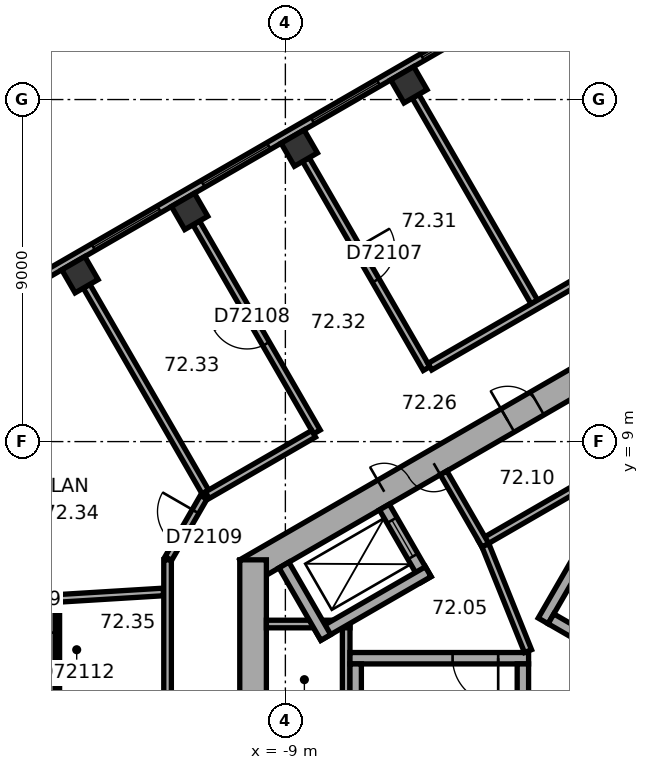
"""IFC4 building model, lengths in metres.
Left out: names, types, materials, properties, quantities, classifications, styles, units other than length and angle.
Written with IfcOpenShell. Run it as: python <this file> out.ifc"""

import sys

from ifc_helpers import new_model, si_unit, direction, frame, frame_2d, origin, origin_2d, place, context, subcontext, project, spatial, rectangle, extrude, element, fill, save


model = new_model("IFC4")
c1 = context("Model", 3, precision=1e-05, world=origin(), true_north=direction((0.0, 1.0)))
c2 = subcontext(c1, "Body", "Model", "MODEL_VIEW")
j1 = project(units=[si_unit("LENGTHUNIT", "METRE"), si_unit("PLANEANGLEUNIT", "RADIAN")], contexts=[c1])
p1 = place(None, origin())
s1 = spatial("IfcSite", under=j1, at=p1, CompositionType="ELEMENT")
p2 = place(p1, origin())
s2 = spatial("IfcBuilding", under=s1, at=p2, CompositionType="ELEMENT")
p3 = place(p2, frame((0.0, 0.0, 293.1)))
s3 = spatial("IfcBuildingStorey", under=s2, at=p3, CompositionType="ELEMENT", Elevation=293.1)
for number, where, z_axis, x_axis in (
    (1, (-5.75, 18.389, 0.0), (0.0, 0.0, 1.0), (-0.866, -0.5, 0.0)),
    (2, (-8.635, 16.723, 0.0), (0.0, 0.0, 1.0), (-0.866, -0.5, 0.0)),
    (3, (-11.52, 15.057, 0.0), (0.0, 0.0, 1.0), (-0.866, -0.5, 0.0)),
    (4, (-14.406, 13.391, 0.0), (0.0, 0.0, 1.0), (-0.866, -0.5, 0.0)),
):
    element("IfcColumn", number, at=place(p3, frame(where, z_axis=z_axis, x_axis=x_axis)), inside=s3, PredefinedType="COLUMN", context=c2, shape_type="SweptSolid", body=[
        extrude(rectangle(XDim=0.7, YDim=0.7, at=origin_2d()), origin(), (0.0, 0.0, 1.0), 3.7),
    ])
p4 = place(p3, frame((0.175, 11.475, 0.0), z_axis=(0.0, 0.0, 1.0), x_axis=(-0.866026453023, -0.499998182661, 0.0)))
e5 = element("IfcWall", 5, at=p4, inside=s3, PredefinedType="SHEAR", context=c2, shape_type="SweptSolid", body=[
    extrude(rectangle(XDim=11.778, YDim=0.7, at=frame_2d((5.889, 0.0))), origin(), (0.0, 0.0, 1.0), 3.7),
])
p5 = place(p4, frame((6.089, 0.0, 0.0)))
e6 = element("IfcOpeningElement", 6, at=p5, cuts=e5, PredefinedType="OPENING", context=c2, shape_type="SweptSolid", body=[
    extrude(rectangle(XDim=1.5, YDim=2.1, at=frame_2d((0.75, 1.05))), frame((0.0, 0.36, 0.0), z_axis=(0.0, -1.0, 0.0), x_axis=(1.0, 0.0, 0.0)), (0.0, 0.0, 1.0), 0.72),
])
p6 = place(p4, frame((2.939, 0.0, 0.0)))
e7 = element("IfcOpeningElement", 7, at=p6, cuts=e5, PredefinedType="OPENING", context=c2, shape_type="SweptSolid", body=[
    extrude(rectangle(XDim=0.9, YDim=2.1, at=frame_2d((0.45, 1.05))), frame((0.0, 0.36, 0.0), z_axis=(0.0, -1.0, 0.0), x_axis=(1.0, 0.0, 0.0)), (0.0, 0.0, 1.0), 0.72),
])
p7 = place(p3, frame((-9.85, 5.889, 0.0), z_axis=(0.0, 0.0, 1.0), x_axis=(0.0, -1.0, 0.0)))
e8 = element("IfcWall", 8, at=p7, inside=s3, PredefinedType="SHEAR", context=c2, shape_type="SweptSolid", body=[
    extrude(rectangle(XDim=11.778, YDim=0.7, at=frame_2d((5.889, 0.0))), origin(), (0.0, 0.0, 1.0), 3.7),
])
p8 = place(p7, frame((5.039, 0.0, 0.0)))
e9 = element("IfcOpeningElement", 9, at=p8, cuts=e8, PredefinedType="OPENING", context=c2, shape_type="SweptSolid", body=[
    extrude(rectangle(XDim=1.1, YDim=2.1, at=frame_2d((0.55, 1.05))), frame((0.0, 0.36, 0.0), z_axis=(0.0, -1.0, 0.0), x_axis=(1.0, 0.0, 0.0)), (0.0, 0.0, 1.0), 0.72),
])
p9 = place(p7, frame((7.639, 0.0, 0.0)))
e10 = element("IfcOpeningElement", 10, at=p9, cuts=e8, PredefinedType="OPENING", context=c2, shape_type="SweptSolid", body=[
    extrude(rectangle(XDim=1.1, YDim=2.1, at=frame_2d((0.55, 1.05))), frame((0.0, 0.36, 0.0), z_axis=(0.0, -1.0, 0.0), x_axis=(1.0, 0.0, 0.0)), (0.0, 0.0, 1.0), 0.72),
])
p10 = place(p3, frame((-2.624, 20.713, 0.0), z_axis=(0.0, 0.0, 1.0), x_axis=(-0.866026460444, -0.499998169808, 0.0)))
e11 = element("IfcWall", 11, at=p10, inside=s3, PredefinedType="STANDARD", context=c2, shape_type="SweptSolid", body=[
    extrude(rectangle(XDim=17.731, YDim=0.2, at=frame_2d((8.866, 0.0))), origin(), (0.0, 0.0, 1.0), 3.7),
])
p11 = place(p10, frame((1.203, 0.0, 0.9)))
e12 = element("IfcOpeningElement", 12, at=p11, cuts=e11, PredefinedType="OPENING", context=c2, shape_type="SweptSolid", body=[
    extrude(rectangle(XDim=2.0, YDim=2.0, at=frame_2d((1.0, 1.0))), frame((0.0, 0.11, 0.0), z_axis=(0.0, -1.0, 0.0), x_axis=(1.0, 0.0, 0.0)), (0.0, 0.0, 1.0), 0.22),
])
p12 = place(p10, frame((4.535, 0.0, 0.9)))
e13 = element("IfcOpeningElement", 13, at=p12, cuts=e11, PredefinedType="OPENING", context=c2, shape_type="SweptSolid", body=[
    extrude(rectangle(XDim=2.0, YDim=2.0, at=frame_2d((1.0, 1.0))), frame((0.0, 0.11, 0.0), z_axis=(0.0, -1.0, 0.0), x_axis=(1.0, 0.0, 0.0)), (0.0, 0.0, 1.0), 0.22),
])
p13 = place(p10, frame((7.867, 0.0, 0.9)))
e14 = element("IfcOpeningElement", 14, at=p13, cuts=e11, PredefinedType="OPENING", context=c2, shape_type="SweptSolid", body=[
    extrude(rectangle(XDim=2.0, YDim=2.0, at=frame_2d((1.0, 1.0))), frame((0.0, 0.11, 0.0), z_axis=(0.0, -1.0, 0.0), x_axis=(1.0, 0.0, 0.0)), (0.0, 0.0, 1.0), 0.22),
])
p14 = place(p10, frame((11.198, 0.0, 0.9)))
e15 = element("IfcOpeningElement", 15, at=p14, cuts=e11, PredefinedType="OPENING", context=c2, shape_type="SweptSolid", body=[
    extrude(rectangle(XDim=2.0, YDim=2.0, at=frame_2d((1.0, 1.0))), frame((0.0, 0.11, 0.0), z_axis=(0.0, -1.0, 0.0), x_axis=(1.0, 0.0, 0.0)), (0.0, 0.0, 1.0), 0.22),
])
p15 = place(p10, frame((14.53, 0.0, 0.9)))
e16 = element("IfcOpeningElement", 16, at=p15, cuts=e11, PredefinedType="OPENING", context=c2, shape_type="SweptSolid", body=[
    extrude(rectangle(XDim=2.0, YDim=2.0, at=frame_2d((1.0, 1.0))), frame((0.0, 0.11, 0.0), z_axis=(0.0, -1.0, 0.0), x_axis=(1.0, 0.0, 0.0)), (0.0, 0.0, 1.0), 0.22),
])
p16 = place(p3, frame((0.803, 9.009, 0.0), z_axis=(0.0, 0.0, 1.0), x_axis=(-0.866028230842, -0.499995103361, 0.0)))
e17 = element("IfcWall", 17, at=p16, inside=s3, PredefinedType="PARTITIONING", context=c2, shape_type="SweptSolid", body=[
    extrude(rectangle(XDim=5.4, YDim=0.2, at=frame_2d((2.7, 0.0))), origin(), (0.0, 0.0, 1.0), 3.42),
])
p17 = place(p3, frame((-3.737, 6.272, 0.0), z_axis=(0.0, 0.0, 1.0), x_axis=(-0.50002983664, 0.866008176907, 0.0)))
e18 = element("IfcWall", 18, at=p17, inside=s3, PredefinedType="PARTITIONING", context=c2, shape_type="SweptSolid", body=[
    extrude(rectangle(XDim=2.2, YDim=0.2, at=frame_2d((1.1, 0.0))), origin(), (0.0, 0.0, 1.0), 3.42),
])
p18 = place(p3, frame((-7.4, 4.3, 0.0), z_axis=(0.0, 0.0, 1.0), x_axis=(0.0, -1.0, 0.0)))
e19 = element("IfcWall", 19, at=p18, inside=s3, PredefinedType="PARTITIONING", context=c2, shape_type="SweptSolid", body=[
    extrude(rectangle(XDim=8.0, YDim=0.2, at=frame_2d((4.0, 0.0))), origin(), (0.0, 0.0, 1.0), 3.42),
])
p19 = place(p3, frame((-7.3, 4.2, 0.0), z_axis=(0.0, 0.0, 1.0), x_axis=(-1.0, 0.0, 0.0)))
e20 = element("IfcWall", 20, at=p19, inside=s3, PredefinedType="PARTITIONING", context=c2, shape_type="SweptSolid", body=[
    extrude(rectangle(XDim=2.2, YDim=0.2, at=frame_2d((1.1, 0.0))), origin(), (0.0, 0.0, 1.0), 3.42),
])
p20 = place(p3, frame((-2.216, 4.282, 0.0), z_axis=(0.0, 0.0, 1.0), x_axis=(0.499977259774, 0.866038532462, 0.0)))
e21 = element("IfcWall", 21, at=p20, inside=s3, PredefinedType="SHEAR", context=c2, shape_type="SweptSolid", body=[
    extrude(rectangle(XDim=4.7, YDim=0.3, at=frame_2d((2.35, 0.0))), origin(), (0.0, 0.0, 1.0), 3.42),
])
p21 = place(p3, frame((4.103, 0.807, 0.0), z_axis=(0.0, 0.0, 1.0), x_axis=(-0.866027801685, 0.499995846692, 0.0)))
e22 = element("IfcWall", 22, at=p21, inside=s3, PredefinedType="SHEAR", context=c2, shape_type="SweptSolid", body=[
    extrude(rectangle(XDim=7.06, YDim=0.3, at=frame_2d((3.53, 0.0))), origin(), (0.0, 0.0, 1.0), 3.42),
])
p22 = place(p3, frame((-2.6, 3.3, 0.0), z_axis=(0.0, 0.0, 1.0), x_axis=(-1.0, 0.0, 0.0)))
e23 = element("IfcWall", 23, at=p22, inside=s3, PredefinedType="SHEAR", context=c2, shape_type="SweptSolid", body=[
    extrude(rectangle(XDim=4.7, YDim=0.3, at=frame_2d((2.35, 0.0))), origin(), (0.0, 0.0, 1.0), 3.42),
])
p23 = place(p22, frame((0.8, 0.0, 0.0)))
e24 = element("IfcOpeningElement", 24, at=p23, cuts=e23, PredefinedType="OPENING", context=c2, shape_type="SweptSolid", body=[
    extrude(rectangle(XDim=1.2, YDim=2.1, at=frame_2d((0.6, 1.05))), frame((0.0, 0.16, 0.0), z_axis=(0.0, -1.0, 0.0), x_axis=(1.0, 0.0, 0.0)), (0.0, 0.0, 1.0), 0.32),
])
for number, where, z_axis, x_axis in (
    (25, (-2.75, 3.15, 0.0), (0.0, 0.0, 1.0), (0.0, -1.0, 0.0)),
    (26, (-7.15, 3.15, 0.0), (0.0, 0.0, 1.0), (0.0, -1.0, 0.0)),
):
    element("IfcWall", number, at=place(p3, frame(where, z_axis=z_axis, x_axis=x_axis)), inside=s3, PredefinedType="SHEAR", context=c2, shape_type="SweptSolid", body=[
        extrude(rectangle(XDim=7.06, YDim=0.3, at=frame_2d((3.53, 0.0))), origin(), (0.0, 0.0, 1.0), 3.42),
    ])
p24 = place(p3, frame((-5.295, 5.372, 0.0), z_axis=(0.0, 0.0, 1.0), x_axis=(-0.500077893725, 0.86598042715, 0.0)))
e27 = element("IfcWall", 27, at=p24, inside=s3, PredefinedType="SHEAR", context=c2, shape_type="SweptSolid", body=[
    extrude(rectangle(XDim=2.2, YDim=0.3, at=frame_2d((1.1, 0.0))), origin(), (0.0, 0.0, 1.0), 3.42),
])
p25 = place(p24, frame((0.7, 0.0, 0.0)))
e28 = element("IfcOpeningElement", 28, at=p25, cuts=e27, PredefinedType="OPENING", context=c2, shape_type="SweptSolid", body=[
    extrude(rectangle(XDim=1.1, YDim=2.1, at=frame_2d((0.55, 1.05))), frame((0.0, 0.16, 0.0), z_axis=(0.0, -1.0, 0.0), x_axis=(1.0, 0.0, 0.0)), (0.0, 0.0, 1.0), 0.32),
])
p26 = place(p3, frame((-5.24, 5.577, 0.0), z_axis=(0.0, 0.0, 1.0), x_axis=(-0.866014461049, -0.500018952895, 0.0)))
e29 = element("IfcWall", 29, at=p26, inside=s3, PredefinedType="SHEAR", context=c2, shape_type="SweptSolid", body=[
    extrude(rectangle(XDim=3.35, YDim=0.3, at=frame_2d((1.675, 0.0))), origin(), (0.0, 0.0, 1.0), 3.42),
])
p27 = place(p3, frame((-7.937, 3.847, 0.0), z_axis=(0.0, 0.0, 1.0), x_axis=(-0.50002983664, 0.866008176907, 0.0)))
e30 = element("IfcWall", 30, at=p27, inside=s3, PredefinedType="SHEAR", context=c2, shape_type="SweptSolid", body=[
    extrude(rectangle(XDim=2.2, YDim=0.3, at=frame_2d((1.1, 0.0))), origin(), (0.0, 0.0, 1.0), 3.42),
])
p28 = place(p3, frame((-2.615, 3.487, 0.0), z_axis=(0.0, 0.0, 1.0), x_axis=(-0.373576831041, 0.92759924068, 0.0)))
e31 = element("IfcWall", 31, at=p28, inside=s3, PredefinedType="PARTITIONING", context=c2, shape_type="SweptSolid", body=[
    extrude(rectangle(XDim=3.002, YDim=0.2, at=frame_2d((1.501, 0.0))), origin(), (0.0, 0.0, 1.0), 3.42),
])
p29 = place(p3, frame((-18.768, 4.643, 0.0), z_axis=(0.0, 0.0, 1.0), x_axis=(0.99813496285, 0.0610458511, 0.0)))
e32 = element("IfcWall", 32, at=p29, inside=s3, PredefinedType="PARTITIONING", context=c2, shape_type="SweptSolid", body=[
    extrude(rectangle(XDim=6.571, YDim=0.2, at=frame_2d((3.285, 0.0))), origin(), (0.0, 0.0, 1.0), 3.42),
])
p30 = place(p3, frame((-15.001, 4.773, 0.0), z_axis=(0.0, 0.0, 1.0), x_axis=(0.0, -1.0, 0.0)))
e33 = element("IfcWall", 33, at=p30, inside=s3, PredefinedType="PARTITIONING", context=c2, shape_type="SweptSolid", body=[
    extrude(rectangle(XDim=6.476, YDim=0.12, at=frame_2d((3.238, 0.0))), origin(), (0.0, 0.0, 1.0), 3.42),
])
p31 = place(p30, frame((5.011, 0.0, 0.0)))
e34 = element("IfcOpeningElement", 34, at=p31, cuts=e33, PredefinedType="OPENING", context=c2, shape_type="SweptSolid", body=[
    extrude(rectangle(XDim=1.0, YDim=2.1, at=frame_2d((0.5, 1.05))), frame((0.0, 0.07, 0.0), z_axis=(0.0, -1.0, 0.0), x_axis=(1.0, 0.0, 0.0)), (0.0, 0.0, 1.0), 0.14),
])
p32 = place(p30, frame((0.8, 0.0, 0.0)))
e35 = element("IfcOpeningElement", 35, at=p32, cuts=e33, PredefinedType="OPENING", context=c2, shape_type="SweptSolid", body=[
    extrude(rectangle(XDim=0.9, YDim=2.1, at=frame_2d((0.45, 1.05))), frame((0.0, 0.07, 0.0), z_axis=(0.0, -1.0, 0.0), x_axis=(1.0, 0.0, 0.0)), (0.0, 0.0, 1.0), 0.14),
])
p33 = place(p30, frame((3.073, 0.0, 0.0)))
e36 = element("IfcOpeningElement", 36, at=p33, cuts=e33, PredefinedType="OPENING", context=c2, shape_type="SweptSolid", body=[
    extrude(rectangle(XDim=0.9, YDim=2.1, at=frame_2d((0.45, 1.05))), frame((0.0, 0.07, 0.0), z_axis=(0.0, -1.0, 0.0), x_axis=(1.0, 0.0, 0.0)), (0.0, 0.0, 1.0), 0.14),
])
p34 = place(p3, frame((-14.23, 13.088, 0.0), z_axis=(0.0, 0.0, 1.0), x_axis=(0.500004234368, -0.866022959057, 0.0)))
e37 = element("IfcWall", 37, at=p34, inside=s3, PredefinedType="PARTITIONING", context=c2, shape_type="SweptSolid", body=[
    extrude(rectangle(XDim=6.25, YDim=0.2, at=frame_2d((3.125, 0.0))), origin(), (0.0, 0.0, 1.0), 3.42),
])
p35 = place(p3, frame((-12.1, 5.889, 0.0), z_axis=(0.0, 0.0, 1.0), x_axis=(0.0, -1.0, 0.0)))
e38 = element("IfcWall", 38, at=p35, inside=s3, PredefinedType="PARTITIONING", context=c2, shape_type="SweptSolid", body=[
    extrude(rectangle(XDim=3.688, YDim=0.2, at=frame_2d((1.844, 0.0))), origin(), (0.0, 0.0, 1.0), 3.42),
])
p36 = place(p3, frame((-11.345, 14.754, 0.0), z_axis=(0.0, 0.0, 1.0), x_axis=(0.500005339912, -0.866022320763, 0.0)))
e39 = element("IfcWall", 39, at=p36, inside=s3, PredefinedType="PARTITIONING", context=c2, shape_type="SweptSolid", body=[
    extrude(rectangle(XDim=6.35, YDim=0.2, at=frame_2d((3.175, 0.0))), origin(), (0.0, 0.0, 1.0), 3.42),
])
p37 = place(p36, frame((2.675, 0.0, 0.0)))
e40 = element("IfcOpeningElement", 40, at=p37, cuts=e39, PredefinedType="OPENING", context=c2, shape_type="SweptSolid", body=[
    extrude(rectangle(XDim=1.0, YDim=2.1, at=frame_2d((0.5, 1.05))), frame((0.0, 0.11, 0.0), z_axis=(0.0, -1.0, 0.0), x_axis=(1.0, 0.0, 0.0)), (0.0, 0.0, 1.0), 0.22),
])
p38 = place(p3, frame((-11.15, 7.534, 0.0), z_axis=(0.0, 0.0, 1.0), x_axis=(-0.500063286585, -0.865988862174, 0.0)))
e41 = element("IfcWall", 41, at=p38, inside=s3, PredefinedType="PARTITIONING", context=c2, shape_type="SweptSolid", body=[
    extrude(rectangle(XDim=1.86, YDim=0.2, at=frame_2d((0.93, 0.0))), origin(), (0.0, 0.0, 1.0), 3.42),
])
p39 = place(p38, frame((0.43, 0.0, 0.0)))
e42 = element("IfcOpeningElement", 42, at=p39, cuts=e41, PredefinedType="OPENING", context=c2, shape_type="SweptSolid", body=[
    extrude(rectangle(XDim=1.0, YDim=2.1, at=frame_2d((0.5, 1.05))), frame((0.0, 0.11, 0.0), z_axis=(0.0, -1.0, 0.0), x_axis=(1.0, 0.0, 0.0)), (0.0, 0.0, 1.0), 0.22),
])
p40 = place(p3, frame((-8.46, 16.42, 0.0), z_axis=(0.0, 0.0, 1.0), x_axis=(0.500005339912, -0.866022320763, 0.0)))
e43 = element("IfcWall", 43, at=p40, inside=s3, PredefinedType="PARTITIONING", context=c2, shape_type="SweptSolid", body=[
    extrude(rectangle(XDim=6.35, YDim=0.2, at=frame_2d((3.175, 0.0))), origin(), (0.0, 0.0, 1.0), 2.87),
])
p41 = place(p40, frame((2.675, 0.0, 0.0)))
e44 = element("IfcOpeningElement", 44, at=p41, cuts=e43, PredefinedType="OPENING", context=c2, shape_type="SweptSolid", body=[
    extrude(rectangle(XDim=1.0, YDim=2.1, at=frame_2d((0.5, 1.05))), frame((0.0, 0.11, 0.0), z_axis=(0.0, -1.0, 0.0), x_axis=(1.0, 0.0, 0.0)), (0.0, 0.0, 1.0), 0.22),
])
p42 = place(p3, frame((-8.257, 9.205, 0.0), z_axis=(0.0, 0.0, 1.0), x_axis=(-0.866030838723, -0.499990586292, 0.0)))
e45 = element("IfcWall", 45, at=p42, inside=s3, PredefinedType="PARTITIONING", context=c2, shape_type="SweptSolid", body=[
    extrude(rectangle(XDim=3.231, YDim=0.2, at=frame_2d((1.616, 0.0))), origin(), (0.0, 0.0, 1.0), 3.42),
])
p43 = place(p3, frame((-5.575, 18.086, 0.0), z_axis=(0.0, 0.0, 1.0), x_axis=(0.500004234368, -0.866022959057, 0.0)))
e46 = element("IfcWall", 46, at=p43, inside=s3, PredefinedType="PARTITIONING", context=c2, shape_type="SweptSolid", body=[
    extrude(rectangle(XDim=6.25, YDim=0.2, at=frame_2d((3.125, 0.0))), origin(), (0.0, 0.0, 1.0), 3.42),
])
p44 = place(p3, frame((-0.95, 13.423, 0.0), z_axis=(0.0, 0.0, 1.0), x_axis=(-0.86603557629, -0.499982380289, 0.0)))
e47 = element("IfcWall", 47, at=p44, inside=s3, PredefinedType="PARTITIONING", context=c2, shape_type="SweptSolid", body=[
    extrude(rectangle(XDim=4.906, YDim=0.2, at=frame_2d((2.453, 0.0))), origin(), (0.0, 0.0, 1.0), 3.42),
])
p45 = place(p11, origin())
e48 = element("IfcWindow", 48, at=p45, inside=s3, PartitioningType="SINGLE_PANEL", PredefinedType="WINDOW", context=c2, shape_type="SweptSolid", body=[
    extrude(rectangle(XDim=2.0, YDim=2.0, at=frame_2d((1.0, 1.0))), frame((0.0, 0.03, 0.0), z_axis=(0.0, -1.0, 0.0), x_axis=(1.0, 0.0, 0.0)), (0.0, 0.0, 1.0), 0.06),
])
fill(e12, e48)
p46 = place(p12, origin())
e49 = element("IfcWindow", 49, at=p46, inside=s3, PartitioningType="SINGLE_PANEL", PredefinedType="WINDOW", context=c2, shape_type="SweptSolid", body=[
    extrude(rectangle(XDim=2.0, YDim=2.0, at=frame_2d((1.0, 1.0))), frame((0.0, 0.03, 0.0), z_axis=(0.0, -1.0, 0.0), x_axis=(1.0, 0.0, 0.0)), (0.0, 0.0, 1.0), 0.06),
])
fill(e13, e49)
p47 = place(p13, origin())
e50 = element("IfcWindow", 50, at=p47, inside=s3, PartitioningType="SINGLE_PANEL", PredefinedType="WINDOW", context=c2, shape_type="SweptSolid", body=[
    extrude(rectangle(XDim=2.0, YDim=2.0, at=frame_2d((1.0, 1.0))), frame((0.0, 0.03, 0.0), z_axis=(0.0, -1.0, 0.0), x_axis=(1.0, 0.0, 0.0)), (0.0, 0.0, 1.0), 0.06),
])
fill(e14, e50)
p48 = place(p14, origin())
e51 = element("IfcWindow", 51, at=p48, inside=s3, PartitioningType="SINGLE_PANEL", PredefinedType="WINDOW", context=c2, shape_type="SweptSolid", body=[
    extrude(rectangle(XDim=2.0, YDim=2.0, at=frame_2d((1.0, 1.0))), frame((0.0, 0.03, 0.0), z_axis=(0.0, -1.0, 0.0), x_axis=(1.0, 0.0, 0.0)), (0.0, 0.0, 1.0), 0.06),
])
fill(e15, e51)
p49 = place(p5, origin())
e52 = element("IfcDoor", 52, at=p49, inside=s3, OperationType="DOUBLE_DOOR_SINGLE_SWING", PredefinedType="DOOR", context=c2, shape_type="SweptSolid", body=[
    extrude(rectangle(XDim=1.5, YDim=2.1, at=frame_2d((0.75, 1.05))), frame((0.0, 0.025, 0.0), z_axis=(0.0, -1.0, 0.0), x_axis=(1.0, 0.0, 0.0)), (0.0, 0.0, 1.0), 0.05),
])
fill(e6, e52)
p50 = place(p23, origin())
e53 = element("IfcDoor", 53, at=p50, inside=s3, OperationType="SINGLE_SWING_RIGHT", PredefinedType="DOOR", context=c2, shape_type="SweptSolid", body=[
    extrude(rectangle(XDim=1.2, YDim=2.1, at=frame_2d((0.6, 1.05))), frame((0.0, 0.025, 0.0), z_axis=(0.0, -1.0, 0.0), x_axis=(1.0, 0.0, 0.0)), (0.0, 0.0, 1.0), 0.05),
])
fill(e24, e53)
p51 = place(p6, origin())
e54 = element("IfcDoor", 54, at=p51, inside=s3, OperationType="SINGLE_SWING_LEFT", PredefinedType="DOOR", context=c2, shape_type="SweptSolid", body=[
    extrude(rectangle(XDim=0.9, YDim=2.1, at=frame_2d((0.45, 1.05))), frame((0.0, 0.025, 0.0), z_axis=(0.0, -1.0, 0.0), x_axis=(1.0, 0.0, 0.0)), (0.0, 0.0, 1.0), 0.05),
])
fill(e7, e54)
p52 = place(p25, origin())
e55 = element("IfcDoor", 55, at=p52, inside=s3, OperationType="DOUBLE_DOOR_SLIDING", PredefinedType="DOOR", context=c2, shape_type="SweptSolid", body=[
    extrude(rectangle(XDim=1.1, YDim=2.1, at=frame_2d((0.55, 1.05))), frame((0.0, 0.025, 0.0), z_axis=(0.0, -1.0, 0.0), x_axis=(1.0, 0.0, 0.0)), (0.0, 0.0, 1.0), 0.05),
])
fill(e28, e55)
p53 = place(p41, origin())
e56 = element("IfcDoor", 56, at=p53, inside=s3, OperationType="SINGLE_SWING_LEFT", PredefinedType="DOOR", context=c2, shape_type="SweptSolid", body=[
    extrude(rectangle(XDim=1.0, YDim=2.1, at=frame_2d((0.5, 1.05))), frame((0.0, 0.025, 0.0), z_axis=(0.0, -1.0, 0.0), x_axis=(1.0, 0.0, 0.0)), (0.0, 0.0, 1.0), 0.05),
])
fill(e44, e56)
p54 = place(p37, origin())
e57 = element("IfcDoor", 57, at=p54, inside=s3, OperationType="SINGLE_SWING_LEFT", PredefinedType="DOOR", context=c2, shape_type="SweptSolid", body=[
    extrude(rectangle(XDim=1.0, YDim=2.1, at=frame_2d((0.5, 1.05))), frame((0.0, 0.025, 0.0), z_axis=(0.0, -1.0, 0.0), x_axis=(1.0, 0.0, 0.0)), (0.0, 0.0, 1.0), 0.05),
])
fill(e40, e57)
p55 = place(p39, origin())
e58 = element("IfcDoor", 58, at=p55, inside=s3, OperationType="SINGLE_SWING_LEFT", PredefinedType="DOOR", context=c2, shape_type="SweptSolid", body=[
    extrude(rectangle(XDim=1.0, YDim=2.1, at=frame_2d((0.5, 1.05))), frame((0.0, 0.025, 0.0), z_axis=(0.0, -1.0, 0.0), x_axis=(1.0, 0.0, 0.0)), (0.0, 0.0, 1.0), 0.05),
])
fill(e42, e58)
p56 = place(p32, origin())
e59 = element("IfcDoor", 59, at=p56, inside=s3, OperationType="SINGLE_SWING_LEFT", PredefinedType="DOOR", context=c2, shape_type="SweptSolid", body=[
    extrude(rectangle(XDim=0.9, YDim=2.1, at=frame_2d((0.45, 1.05))), frame((0.0, 0.025, 0.0), z_axis=(0.0, -1.0, 0.0), x_axis=(1.0, 0.0, 0.0)), (0.0, 0.0, 1.0), 0.05),
])
fill(e35, e59)
save(model, sys.argv[1])
